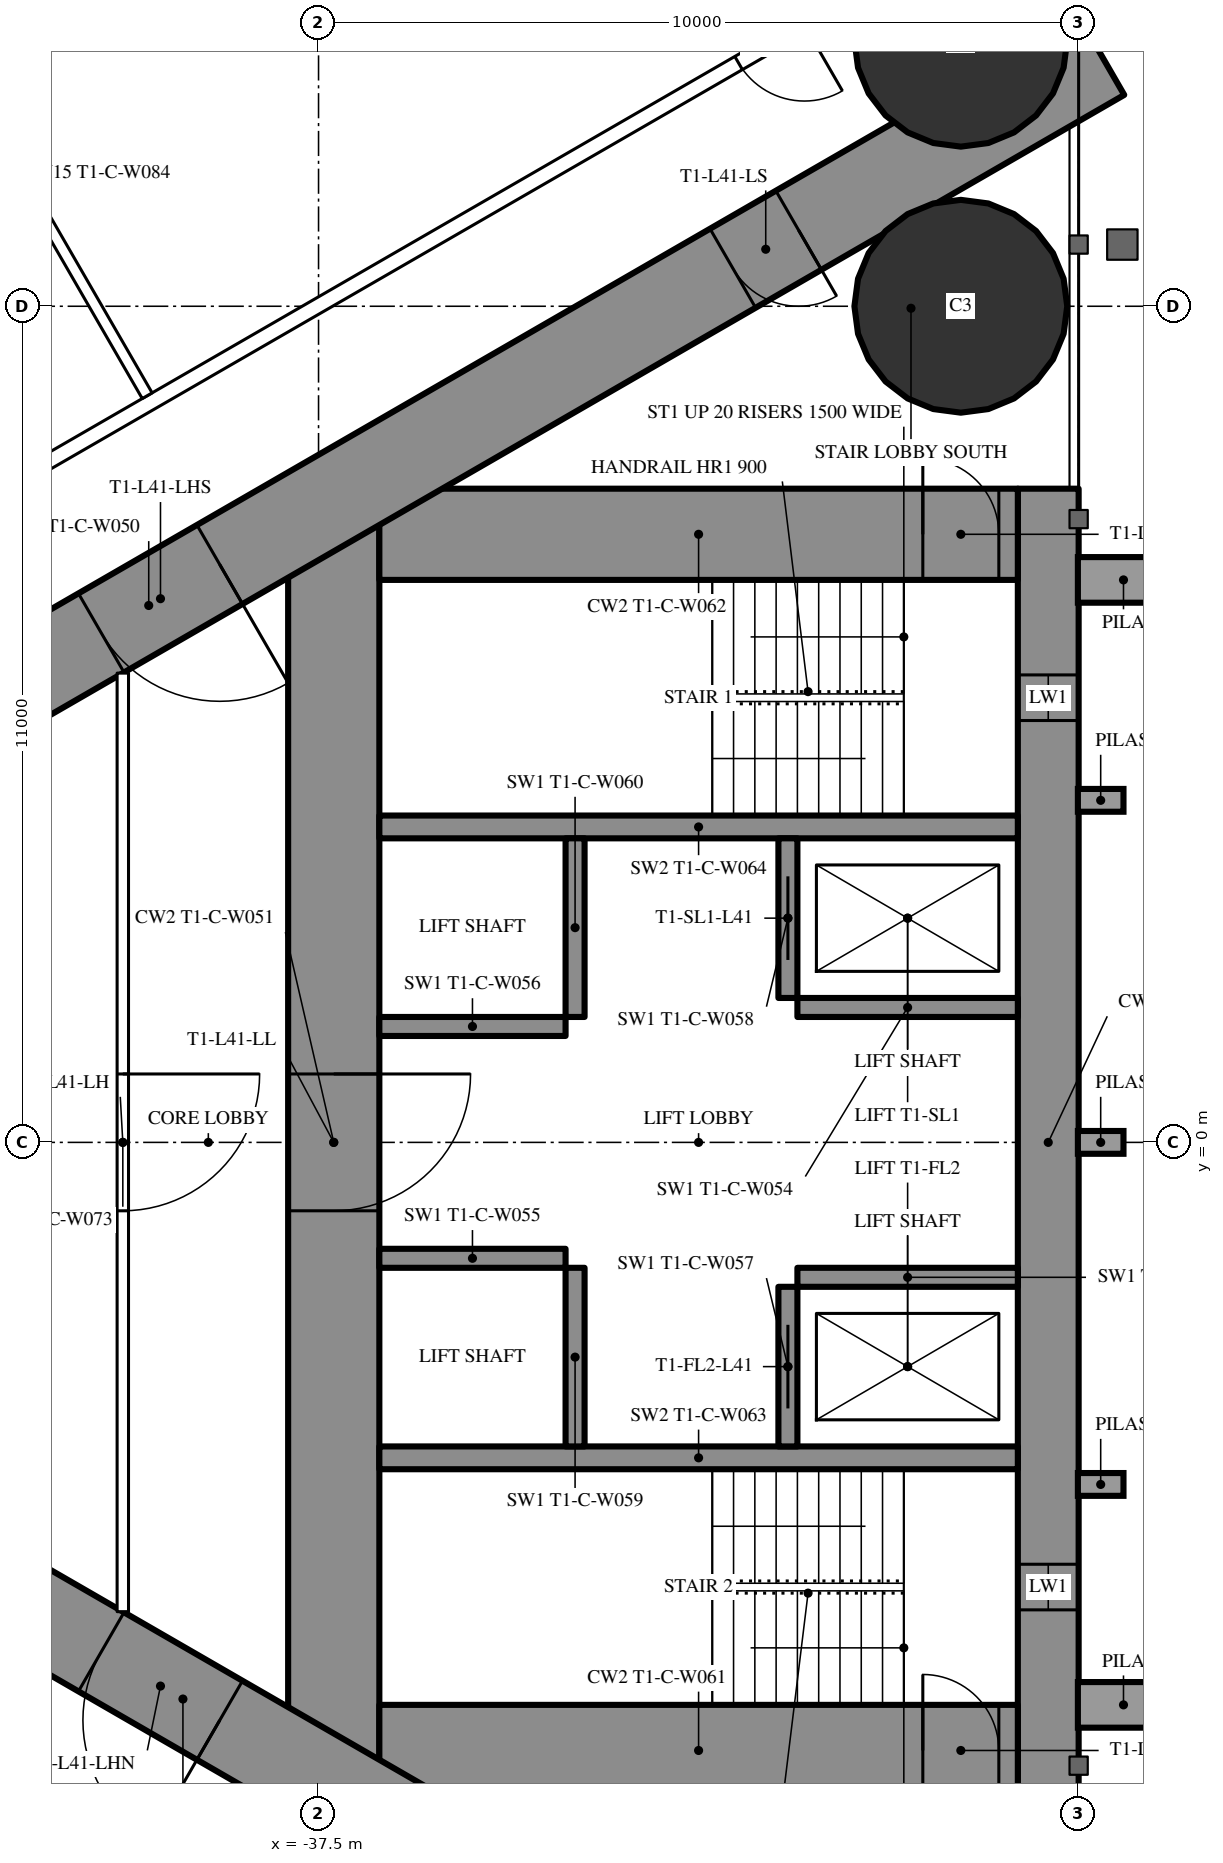
"""IFC4 building model, lengths in metres.
Left out: names, types, materials, properties, quantities, classifications, styles, units other than length and angle.
Written with IfcOpenShell. Run it as: python <this file> out.ifc"""

import sys

from ifc_helpers import new_model, si_unit, direction, frame, frame_2d, origin, origin_2d, place, context, subcontext, project, spatial, rectangle, circle, extrude, element, fill, save


model = new_model("IFC4")
c1 = context("Model", 3, precision=1e-05, world=origin(), true_north=direction((0.0, 1.0)))
c2 = subcontext(c1, "Body", "Model", "MODEL_VIEW")
j1 = project(units=[si_unit("LENGTHUNIT", "METRE"), si_unit("PLANEANGLEUNIT", "RADIAN")], contexts=[c1])
p1 = place(None, origin())
s1 = spatial("IfcSite", under=j1, at=p1, CompositionType="ELEMENT")
p2 = place(p1, origin())
s2 = spatial("IfcBuilding", under=s1, at=p2, CompositionType="ELEMENT")
p3 = place(p2, frame((0.0, 0.0, 156.3)))
s3 = spatial("IfcBuildingStorey", under=s2, at=p3, CompositionType="ELEMENT", Elevation=156.3)
for number, where, z_axis, x_axis in (
    (1, (-29.05, 11.0, 0.0), (0.0, 0.0, 1.0), (1.0, 0.0, 0.0)),
    (2, (-29.05, 14.5, 0.0), (0.0, 0.0, 1.0), (1.0, 0.0, 0.0)),
):
    element("IfcColumn", number, at=place(p3, frame(where, z_axis=z_axis, x_axis=x_axis)), inside=s3, PredefinedType="COLUMN", context=c2, shape_type="SweptSolid", body=[
        extrude(circle(Radius=1.4, at=origin_2d()), origin(), (0.0, 0.0, 1.0), 3.5),
    ])
p4 = place(p3, frame((-27.9, 8.6, 0.0), z_axis=(0.0, 0.0, 1.0), x_axis=(0.0, -1.0, 0.0)))
e3 = element("IfcWall", 3, at=p4, inside=s3, PredefinedType="SHEAR", context=c2, shape_type="SweptSolid", body=[
    extrude(rectangle(XDim=17.2, YDim=0.8, at=frame_2d((8.6, 0.0))), origin(), (0.0, 0.0, 1.0), 3.5),
])
p5 = place(p4, frame((2.45, 0.0, 0.6)))
e4 = element("IfcOpeningElement", 4, at=p5, cuts=e3, PredefinedType="OPENING", context=c2, shape_type="SweptSolid", body=[
    extrude(rectangle(XDim=0.6, YDim=2.1, at=frame_2d((0.3, 1.05))), frame((0.0, 0.41, 0.0), z_axis=(0.0, -1.0, 0.0), x_axis=(1.0, 0.0, 0.0)), (0.0, 0.0, 1.0), 0.82),
])
p6 = place(p4, frame((14.15, 0.0, 0.6)))
e5 = element("IfcOpeningElement", 5, at=p6, cuts=e3, PredefinedType="OPENING", context=c2, shape_type="SweptSolid", body=[
    extrude(rectangle(XDim=0.6, YDim=2.1, at=frame_2d((0.3, 1.05))), frame((0.0, 0.41, 0.0), z_axis=(0.0, -1.0, 0.0), x_axis=(1.0, 0.0, 0.0)), (0.0, 0.0, 1.0), 0.82),
])
p7 = place(p3, frame((-37.3, 8.6, 0.0), z_axis=(0.0, 0.0, 1.0), x_axis=(0.0, -1.0, 0.0)))
e6 = element("IfcWall", 6, at=p7, inside=s3, PredefinedType="SHEAR", context=c2, shape_type="SweptSolid", body=[
    extrude(rectangle(XDim=17.2, YDim=1.2, at=frame_2d((8.6, 0.0))), origin(), (0.0, 0.0, 1.0), 3.5),
])
p8 = place(p7, frame((7.7, 0.0, 0.0)))
e7 = element("IfcOpeningElement", 7, at=p8, cuts=e6, PredefinedType="OPENING", context=c2, shape_type="SweptSolid", body=[
    extrude(rectangle(XDim=1.8, YDim=2.2, at=frame_2d((0.9, 1.1))), frame((0.0, 0.61, 0.0), z_axis=(0.0, -1.0, 0.0), x_axis=(1.0, 0.0, 0.0)), (0.0, 0.0, 1.0), 1.22),
])
p9 = place(p3, frame((-28.3, 8.0, 0.0), z_axis=(0.0, 0.0, 1.0), x_axis=(-1.0, 0.0, 0.0)))
e8 = element("IfcWall", 8, at=p9, inside=s3, PredefinedType="SHEAR", context=c2, shape_type="SweptSolid", body=[
    extrude(rectangle(XDim=8.4, YDim=1.2, at=frame_2d((4.2, 0.0))), origin(), (0.0, 0.0, 1.0), 3.5),
])
p10 = place(p9, frame((0.25, 0.0, 0.0)))
e9 = element("IfcOpeningElement", 9, at=p10, cuts=e8, PredefinedType="OPENING", context=c2, shape_type="SweptSolid", body=[
    extrude(rectangle(XDim=1.0, YDim=2.2, at=frame_2d((0.5, 1.1))), frame((0.0, 0.61, 0.0), z_axis=(0.0, -1.0, 0.0), x_axis=(1.0, 0.0, 0.0)), (0.0, 0.0, 1.0), 1.22),
])
p11 = place(p3, frame((-28.3, -8.0, 0.0), z_axis=(0.0, 0.0, 1.0), x_axis=(-1.0, 0.0, 0.0)))
e10 = element("IfcWall", 10, at=p11, inside=s3, PredefinedType="SHEAR", context=c2, shape_type="SweptSolid", body=[
    extrude(rectangle(XDim=8.4, YDim=1.2, at=frame_2d((4.2, 0.0))), origin(), (0.0, 0.0, 1.0), 3.5),
])
p12 = place(p11, frame((0.25, 0.0, 0.0)))
e11 = element("IfcOpeningElement", 11, at=p12, cuts=e10, PredefinedType="OPENING", context=c2, shape_type="SweptSolid", body=[
    extrude(rectangle(XDim=1.0, YDim=2.2, at=frame_2d((0.5, 1.1))), frame((0.0, 0.61, 0.0), z_axis=(0.0, -1.0, 0.0), x_axis=(1.0, 0.0, 0.0)), (0.0, 0.0, 1.0), 1.22),
])
for number, where, z_axis, x_axis in (
    (12, (-28.3, 4.15, 0.0), (0.0, 0.0, 1.0), (-1.0, 0.0, 0.0)),
    (13, (-28.3, -4.15, 0.0), (0.0, 0.0, 1.0), (-1.0, 0.0, 0.0)),
):
    element("IfcWall", number, at=place(p3, frame(where, z_axis=z_axis, x_axis=x_axis)), inside=s3, PredefinedType="SHEAR", context=c2, shape_type="SweptSolid", body=[
        extrude(rectangle(XDim=8.4, YDim=0.3, at=frame_2d((4.2, 0.0))), origin(), (0.0, 0.0, 1.0), 3.5),
    ])
p13 = place(p3, frame((-31.325, 4.0, 0.0), z_axis=(0.0, 0.0, 1.0), x_axis=(0.0, -1.0, 0.0)))
e14 = element("IfcWall", 14, at=p13, inside=s3, PredefinedType="SHEAR", context=c2, shape_type="SweptSolid", body=[
    extrude(rectangle(XDim=2.1, YDim=0.25, at=frame_2d((1.05, 0.0))), origin(), (0.0, 0.0, 1.0), 3.5),
])
p14 = place(p13, frame((0.5, 0.0, 0.0)))
e15 = element("IfcOpeningElement", 15, at=p14, cuts=e14, PredefinedType="OPENING", context=c2, shape_type="SweptSolid", body=[
    extrude(rectangle(XDim=1.1, YDim=2.2, at=frame_2d((0.55, 1.1))), frame((0.0, 0.135, 0.0), z_axis=(0.0, -1.0, 0.0), x_axis=(1.0, 0.0, 0.0)), (0.0, 0.0, 1.0), 0.27),
])
p15 = place(p3, frame((-34.125, 4.0, 0.0), z_axis=(0.0, 0.0, 1.0), x_axis=(0.0, -1.0, 0.0)))
e16 = element("IfcWall", 16, at=p15, inside=s3, PredefinedType="SHEAR", context=c2, shape_type="SweptSolid", body=[
    extrude(rectangle(XDim=2.35, YDim=0.25, at=frame_2d((1.175, 0.0))), origin(), (0.0, 0.0, 1.0), 3.5),
])
p16 = place(p3, frame((-28.3, 1.775, 0.0), z_axis=(0.0, 0.0, 1.0), x_axis=(-1.0, 0.0, 0.0)))
e17 = element("IfcWall", 17, at=p16, inside=s3, PredefinedType="SHEAR", context=c2, shape_type="SweptSolid", body=[
    extrude(rectangle(XDim=2.9, YDim=0.25, at=frame_2d((1.45, 0.0))), origin(), (0.0, 0.0, 1.0), 3.5),
])
p17 = place(p3, frame((-34.25, 1.525, 0.0), z_axis=(0.0, 0.0, 1.0), x_axis=(-1.0, 0.0, 0.0)))
e18 = element("IfcWall", 18, at=p17, inside=s3, PredefinedType="SHEAR", context=c2, shape_type="SweptSolid", body=[
    extrude(rectangle(XDim=2.45, YDim=0.25, at=frame_2d((1.225, 0.0))), origin(), (0.0, 0.0, 1.0), 3.5),
])
p18 = place(p3, frame((-31.325, -1.9, 0.0), z_axis=(0.0, 0.0, 1.0), x_axis=(0.0, -1.0, 0.0)))
e19 = element("IfcWall", 19, at=p18, inside=s3, PredefinedType="SHEAR", context=c2, shape_type="SweptSolid", body=[
    extrude(rectangle(XDim=2.1, YDim=0.25, at=frame_2d((1.05, 0.0))), origin(), (0.0, 0.0, 1.0), 3.5),
])
p19 = place(p18, frame((0.5, 0.0, 0.0)))
e20 = element("IfcOpeningElement", 20, at=p19, cuts=e19, PredefinedType="OPENING", context=c2, shape_type="SweptSolid", body=[
    extrude(rectangle(XDim=1.1, YDim=2.2, at=frame_2d((0.55, 1.1))), frame((0.0, 0.135, 0.0), z_axis=(0.0, -1.0, 0.0), x_axis=(1.0, 0.0, 0.0)), (0.0, 0.0, 1.0), 0.27),
])
p20 = place(p3, frame((-34.125, -1.65, 0.0), z_axis=(0.0, 0.0, 1.0), x_axis=(0.0, -1.0, 0.0)))
e21 = element("IfcWall", 21, at=p20, inside=s3, PredefinedType="SHEAR", context=c2, shape_type="SweptSolid", body=[
    extrude(rectangle(XDim=2.35, YDim=0.25, at=frame_2d((1.175, 0.0))), origin(), (0.0, 0.0, 1.0), 3.5),
])
p21 = place(p3, frame((-28.3, -1.775, 0.0), z_axis=(0.0, 0.0, 1.0), x_axis=(-1.0, 0.0, 0.0)))
e22 = element("IfcWall", 22, at=p21, inside=s3, PredefinedType="SHEAR", context=c2, shape_type="SweptSolid", body=[
    extrude(rectangle(XDim=2.9, YDim=0.25, at=frame_2d((1.45, 0.0))), origin(), (0.0, 0.0, 1.0), 3.5),
])
p22 = place(p3, frame((-34.25, -1.525, 0.0), z_axis=(0.0, 0.0, 1.0), x_axis=(-1.0, 0.0, 0.0)))
e23 = element("IfcWall", 23, at=p22, inside=s3, PredefinedType="SHEAR", context=c2, shape_type="SweptSolid", body=[
    extrude(rectangle(XDim=2.45, YDim=0.25, at=frame_2d((1.225, 0.0))), origin(), (0.0, 0.0, 1.0), 3.5),
])
p23 = place(p3, frame((-27.2, 14.3, 0.0), z_axis=(0.0, 0.0, 1.0), x_axis=(-0.866026593062, -0.499997940104, 0.0)))
e24 = element("IfcWall", 24, at=p23, inside=s3, PredefinedType="SHEAR", context=c2, shape_type="SweptSolid", body=[
    extrude(rectangle(XDim=28.946, YDim=1.2, at=frame_2d((14.473, 0.0))), origin(), (0.0, 0.0, 1.0), 3.5),
])
p24 = place(p23, frame((4.6, 0.0, 0.0)))
e25 = element("IfcOpeningElement", 25, at=p24, cuts=e24, PredefinedType="OPENING", context=c2, shape_type="SweptSolid", body=[
    extrude(rectangle(XDim=1.0, YDim=2.2, at=frame_2d((0.5, 1.1))), frame((0.0, 0.61, 0.0), z_axis=(0.0, -1.0, 0.0), x_axis=(1.0, 0.0, 0.0)), (0.0, 0.0, 1.0), 1.22),
])
p25 = place(p23, frame((13.395, 0.0, 0.0)))
e26 = element("IfcOpeningElement", 26, at=p25, cuts=e24, PredefinedType="OPENING", context=c2, shape_type="SweptSolid", body=[
    extrude(rectangle(XDim=1.8, YDim=2.2, at=frame_2d((0.9, 1.1))), frame((0.0, 0.61, 0.0), z_axis=(0.0, -1.0, 0.0), x_axis=(1.0, 0.0, 0.0)), (0.0, 0.0, 1.0), 1.22),
])
p26 = place(p3, frame((-27.2, -14.3, 0.0), z_axis=(0.0, 0.0, 1.0), x_axis=(-0.866024021859, 0.500002393557, 0.0)))
e27 = element("IfcWall", 27, at=p26, inside=s3, PredefinedType="SHEAR", context=c2, shape_type="SweptSolid", body=[
    extrude(rectangle(XDim=27.907, YDim=1.2, at=frame_2d((13.954, 0.0))), origin(), (0.0, 0.0, 1.0), 3.5),
])
p27 = place(p26, frame((4.6, 0.0, 0.0)))
e28 = element("IfcOpeningElement", 28, at=p27, cuts=e27, PredefinedType="OPENING", context=c2, shape_type="SweptSolid", body=[
    extrude(rectangle(XDim=1.0, YDim=2.2, at=frame_2d((0.5, 1.1))), frame((0.0, 0.61, 0.0), z_axis=(0.0, -1.0, 0.0), x_axis=(1.0, 0.0, 0.0)), (0.0, 0.0, 1.0), 1.22),
])
p28 = place(p26, frame((13.395, 0.0, 0.0)))
e29 = element("IfcOpeningElement", 29, at=p28, cuts=e27, PredefinedType="OPENING", context=c2, shape_type="SweptSolid", body=[
    extrude(rectangle(XDim=1.8, YDim=2.2, at=frame_2d((0.9, 1.1))), frame((0.0, 0.61, 0.0), z_axis=(0.0, -1.0, 0.0), x_axis=(1.0, 0.0, 0.0)), (0.0, 0.0, 1.0), 1.22),
])
p29 = place(p3, frame((-27.86, 16.575, 0.0), z_axis=(0.0, 0.0, 1.0), x_axis=(-0.866025533911, -0.499999774615, 0.0)))
e30 = element("IfcWall", 30, at=p29, inside=s3, PredefinedType="PARTITIONING", context=c2, shape_type="SweptSolid", body=[
    extrude(rectangle(XDim=33.149, YDim=0.2, at=frame_2d((16.575, 0.0))), origin(), (0.0, 0.0, 1.0), 3.25),
])
p30 = place(p29, frame((3.75, 0.0, 0.0)))
e31 = element("IfcOpeningElement", 31, at=p30, cuts=e30, PredefinedType="OPENING", context=c2, shape_type="SweptSolid", body=[
    extrude(rectangle(XDim=1.0, YDim=2.2, at=frame_2d((0.5, 1.1))), frame((0.0, 0.11, 0.0), z_axis=(0.0, -1.0, 0.0), x_axis=(1.0, 0.0, 0.0)), (0.0, 0.0, 1.0), 0.22),
])
p31 = place(p29, frame((17.997, 0.0, 0.0)))
e32 = element("IfcOpeningElement", 32, at=p31, cuts=e30, PredefinedType="OPENING", context=c2, shape_type="SweptSolid", body=[
    extrude(rectangle(XDim=0.95, YDim=2.2, at=frame_2d((0.475, 1.1))), frame((0.0, 0.11, 0.0), z_axis=(0.0, -1.0, 0.0), x_axis=(1.0, 0.0, 0.0)), (0.0, 0.0, 1.0), 0.22),
])
p32 = place(p29, frame((22.047, 0.0, 0.0)))
e33 = element("IfcOpeningElement", 33, at=p32, cuts=e30, PredefinedType="OPENING", context=c2, shape_type="SweptSolid", body=[
    extrude(rectangle(XDim=0.95, YDim=2.2, at=frame_2d((0.475, 1.1))), frame((0.0, 0.11, 0.0), z_axis=(0.0, -1.0, 0.0), x_axis=(1.0, 0.0, 0.0)), (0.0, 0.0, 1.0), 0.22),
])
p33 = place(p29, frame((30.042, 0.0, 0.0)))
e34 = element("IfcOpeningElement", 34, at=p33, cuts=e30, PredefinedType="OPENING", context=c2, shape_type="SweptSolid", body=[
    extrude(rectangle(XDim=0.95, YDim=2.2, at=frame_2d((0.475, 1.1))), frame((0.0, 0.11, 0.0), z_axis=(0.0, -1.0, 0.0), x_axis=(1.0, 0.0, 0.0)), (0.0, 0.0, 1.0), 0.22),
])
p34 = place(p3, frame((-39.754, 9.823, 0.0), z_axis=(0.0, 0.0, 1.0), x_axis=(-0.499997670926, 0.866026748472, 0.0)))
e35 = element("IfcWall", 35, at=p34, inside=s3, PredefinedType="PARTITIONING", context=c2, shape_type="SweptSolid", body=[
    extrude(rectangle(XDim=6.757, YDim=0.15, at=frame_2d((3.379, 0.0))), origin(), (0.0, 0.0, 1.0), 2.3),
])
p35 = place(p3, frame((-40.075, 6.174, 0.0), z_axis=(0.0, 0.0, 1.0), x_axis=(0.0, -1.0, 0.0)))
e36 = element("IfcWall", 36, at=p35, inside=s3, PredefinedType="PARTITIONING", context=c2, shape_type="SweptSolid", body=[
    extrude(rectangle(XDim=12.348, YDim=0.15, at=frame_2d((6.174, 0.0))), origin(), (0.0, 0.0, 1.0), 3.25),
])
p36 = place(p35, frame((5.274, 0.0, 0.0)))
e37 = element("IfcOpeningElement", 37, at=p36, cuts=e36, PredefinedType="OPENING", context=c2, shape_type="SweptSolid", body=[
    extrude(rectangle(XDim=1.8, YDim=2.2, at=frame_2d((0.9, 1.1))), frame((0.0, 0.085, 0.0), z_axis=(0.0, -1.0, 0.0), x_axis=(1.0, 0.0, 0.0)), (0.0, 0.0, 1.0), 0.17),
])
p37 = place(p3, frame((-39.758, -11.697, 0.0), z_axis=(0.0, 0.0, 1.0), x_axis=(-0.866024194504, 0.500002094529, 0.0)))
e38 = element("IfcWall", 38, at=p37, inside=s3, PredefinedType="PARTITIONING", context=c2, shape_type="SweptSolid", body=[
    extrude(rectangle(XDim=6.6, YDim=0.25, at=frame_2d((3.3, 0.0))), origin(), (0.0, 0.0, 1.0), 3.25),
])
p38 = place(p37, frame((0.75, 0.0, 0.0)))
e39 = element("IfcOpeningElement", 39, at=p38, cuts=e38, PredefinedType="OPENING", context=c2, shape_type="SweptSolid", body=[
    extrude(rectangle(XDim=1.1, YDim=2.2, at=frame_2d((0.55, 1.1))), frame((0.0, 0.135, 0.0), z_axis=(0.0, -1.0, 0.0), x_axis=(1.0, 0.0, 0.0)), (0.0, 0.0, 1.0), 0.27),
])
p39 = place(p37, frame((2.75, 0.0, 0.0)))
e40 = element("IfcOpeningElement", 40, at=p39, cuts=e38, PredefinedType="OPENING", context=c2, shape_type="SweptSolid", body=[
    extrude(rectangle(XDim=1.1, YDim=2.2, at=frame_2d((0.55, 1.1))), frame((0.0, 0.135, 0.0), z_axis=(0.0, -1.0, 0.0), x_axis=(1.0, 0.0, 0.0)), (0.0, 0.0, 1.0), 0.27),
])
p40 = place(p37, frame((4.75, 0.0, 0.0)))
e41 = element("IfcOpeningElement", 41, at=p40, cuts=e38, PredefinedType="OPENING", context=c2, shape_type="SweptSolid", body=[
    extrude(rectangle(XDim=1.1, YDim=2.2, at=frame_2d((0.55, 1.1))), frame((0.0, 0.135, 0.0), z_axis=(0.0, -1.0, 0.0), x_axis=(1.0, 0.0, 0.0)), (0.0, 0.0, 1.0), 0.27),
])
p41 = place(p30, origin())
e42 = element("IfcDoor", 42, at=p41, inside=s3, OperationType="SINGLE_SWING_LEFT", PredefinedType="DOOR", context=c2, shape_type="SweptSolid", body=[
    extrude(rectangle(XDim=1.0, YDim=2.2, at=frame_2d((0.5, 1.1))), frame((0.0, 0.025, 0.0), z_axis=(0.0, -1.0, 0.0), x_axis=(1.0, 0.0, 0.0)), (0.0, 0.0, 1.0), 0.05),
])
fill(e31, e42)
p42 = place(p36, origin())
e43 = element("IfcDoor", 43, at=p42, inside=s3, OperationType="DOUBLE_DOOR_SINGLE_SWING", PredefinedType="DOOR", context=c2, shape_type="SweptSolid", body=[
    extrude(rectangle(XDim=1.8, YDim=2.2, at=frame_2d((0.9, 1.1))), frame((0.0, 0.025, 0.0), z_axis=(0.0, -1.0, 0.0), x_axis=(1.0, 0.0, 0.0)), (0.0, 0.0, 1.0), 0.05),
])
fill(e37, e43)
p43 = place(p24, origin())
e44 = element("IfcDoor", 44, at=p43, inside=s3, OperationType="SINGLE_SWING_LEFT", PredefinedType="DOOR", context=c2, shape_type="SweptSolid", body=[
    extrude(rectangle(XDim=1.0, YDim=2.2, at=frame_2d((0.5, 1.1))), frame((0.0, 0.025, 0.0), z_axis=(0.0, -1.0, 0.0), x_axis=(1.0, 0.0, 0.0)), (0.0, 0.0, 1.0), 0.05),
])
fill(e25, e44)
p44 = place(p25, origin())
e45 = element("IfcDoor", 45, at=p44, inside=s3, OperationType="DOUBLE_DOOR_SINGLE_SWING", PredefinedType="DOOR", context=c2, shape_type="SweptSolid", body=[
    extrude(rectangle(XDim=1.8, YDim=2.2, at=frame_2d((0.9, 1.1))), frame((0.0, 0.025, 0.0), z_axis=(0.0, -1.0, 0.0), x_axis=(1.0, 0.0, 0.0)), (0.0, 0.0, 1.0), 0.05),
])
fill(e26, e45)
p45 = place(p28, origin())
e46 = element("IfcDoor", 46, at=p45, inside=s3, OperationType="DOUBLE_DOOR_SINGLE_SWING", PredefinedType="DOOR", context=c2, shape_type="SweptSolid", body=[
    extrude(rectangle(XDim=1.8, YDim=2.2, at=frame_2d((0.9, 1.1))), frame((0.0, 0.025, 0.0), z_axis=(0.0, -1.0, 0.0), x_axis=(1.0, 0.0, 0.0)), (0.0, 0.0, 1.0), 0.05),
])
fill(e29, e46)
p46 = place(p8, origin())
e47 = element("IfcDoor", 47, at=p46, inside=s3, OperationType="DOUBLE_DOOR_SINGLE_SWING", PredefinedType="DOOR", context=c2, shape_type="SweptSolid", body=[
    extrude(rectangle(XDim=1.8, YDim=2.2, at=frame_2d((0.9, 1.1))), frame((0.0, 0.025, 0.0), z_axis=(0.0, -1.0, 0.0), x_axis=(1.0, 0.0, 0.0)), (0.0, 0.0, 1.0), 0.05),
])
fill(e7, e47)
p47 = place(p10, origin())
e48 = element("IfcDoor", 48, at=p47, inside=s3, OperationType="SINGLE_SWING_RIGHT", PredefinedType="DOOR", context=c2, shape_type="SweptSolid", body=[
    extrude(rectangle(XDim=1.0, YDim=2.2, at=frame_2d((0.5, 1.1))), frame((0.0, 0.025, 0.0), z_axis=(0.0, -1.0, 0.0), x_axis=(1.0, 0.0, 0.0)), (0.0, 0.0, 1.0), 0.05),
])
fill(e9, e48)
p48 = place(p12, origin())
e49 = element("IfcDoor", 49, at=p48, inside=s3, OperationType="SINGLE_SWING_RIGHT", PredefinedType="DOOR", context=c2, shape_type="SweptSolid", body=[
    extrude(rectangle(XDim=1.0, YDim=2.2, at=frame_2d((0.5, 1.1))), frame((0.0, 0.025, 0.0), z_axis=(0.0, -1.0, 0.0), x_axis=(1.0, 0.0, 0.0)), (0.0, 0.0, 1.0), 0.05),
])
fill(e11, e49)
p49 = place(p14, origin())
e50 = element("IfcDoor", 50, at=p49, inside=s3, OperationType="SLIDING_TO_LEFT", PredefinedType="USERDEFINED", context=c2, shape_type="SweptSolid", body=[
    extrude(rectangle(XDim=1.1, YDim=2.2, at=frame_2d((0.55, 1.1))), frame((0.0, 0.025, 0.0), z_axis=(0.0, -1.0, 0.0), x_axis=(1.0, 0.0, 0.0)), (0.0, 0.0, 1.0), 0.05),
])
fill(e15, e50)
p50 = place(p19, origin())
e51 = element("IfcDoor", 51, at=p50, inside=s3, OperationType="SLIDING_TO_LEFT", PredefinedType="USERDEFINED", context=c2, shape_type="SweptSolid", body=[
    extrude(rectangle(XDim=1.1, YDim=2.2, at=frame_2d((0.55, 1.1))), frame((0.0, 0.025, 0.0), z_axis=(0.0, -1.0, 0.0), x_axis=(1.0, 0.0, 0.0)), (0.0, 0.0, 1.0), 0.05),
])
fill(e20, e51)
p51 = place(p5, origin())
e52 = element("IfcWindow", 52, at=p51, inside=s3, PartitioningType="SINGLE_PANEL", PredefinedType="WINDOW", context=c2, shape_type="SweptSolid", body=[
    extrude(rectangle(XDim=0.6, YDim=2.1, at=frame_2d((0.3, 1.05))), frame((0.0, 0.03, 0.0), z_axis=(0.0, -1.0, 0.0), x_axis=(1.0, 0.0, 0.0)), (0.0, 0.0, 1.0), 0.06),
])
fill(e4, e52)
p52 = place(p6, origin())
e53 = element("IfcWindow", 53, at=p52, inside=s3, PartitioningType="SINGLE_PANEL", PredefinedType="WINDOW", context=c2, shape_type="SweptSolid", body=[
    extrude(rectangle(XDim=0.6, YDim=2.1, at=frame_2d((0.3, 1.05))), frame((0.0, 0.03, 0.0), z_axis=(0.0, -1.0, 0.0), x_axis=(1.0, 0.0, 0.0)), (0.0, 0.0, 1.0), 0.06),
])
fill(e5, e53)
save(model, sys.argv[1])
